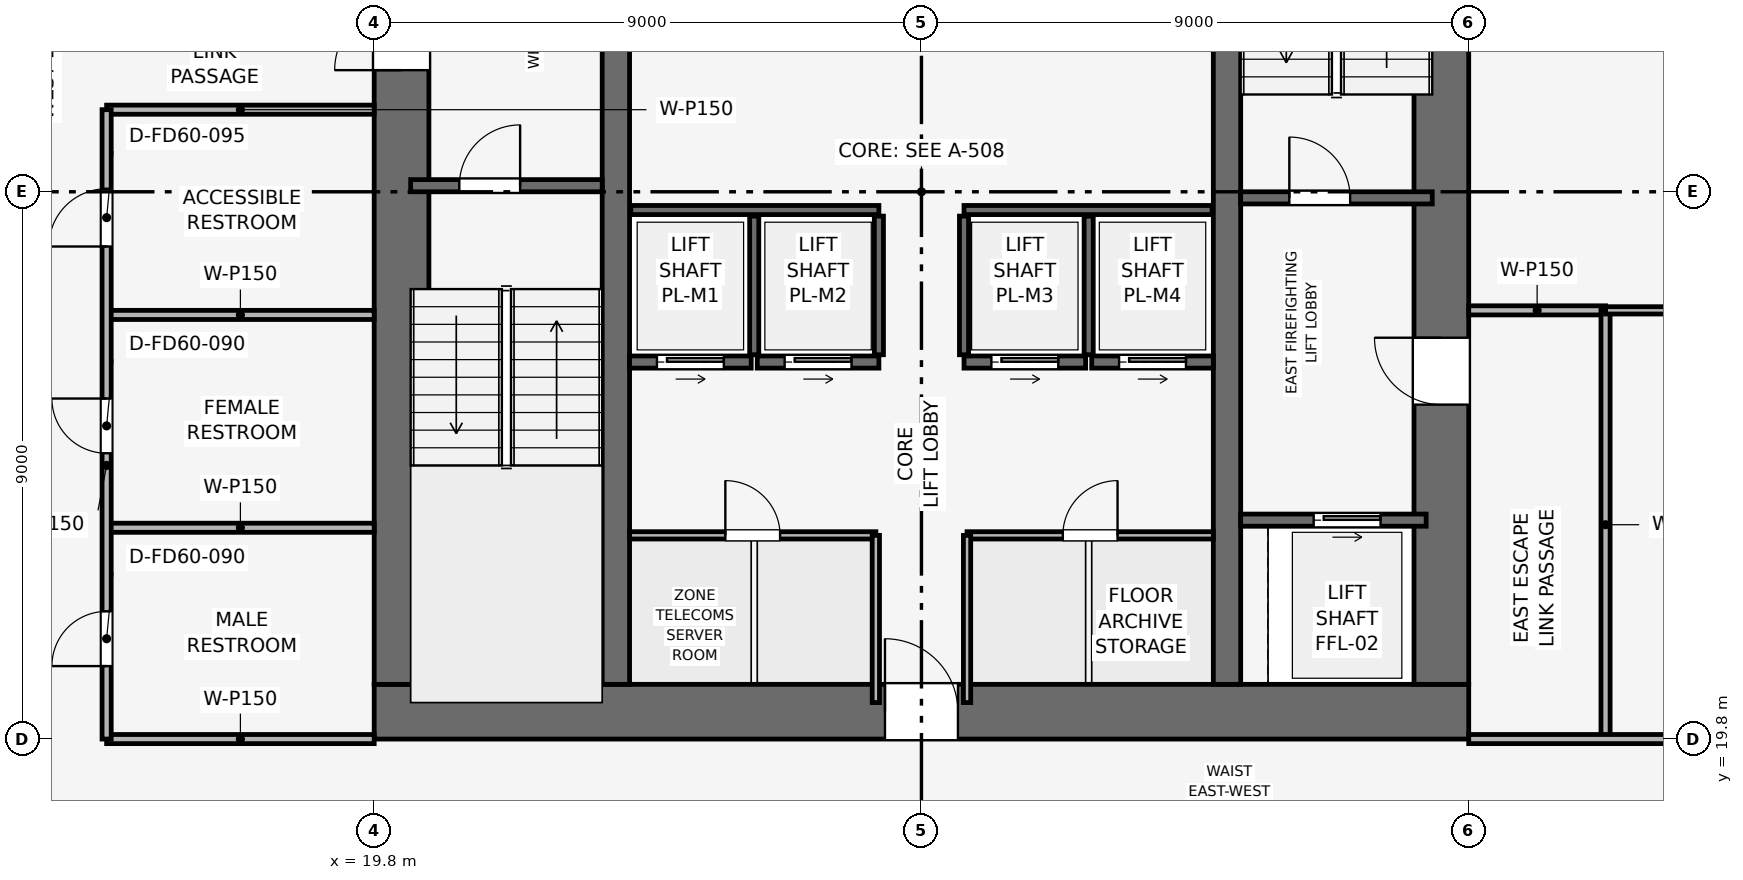
"""IFC4 building model, lengths in metres.
Left out: names, types, materials, properties, quantities, classifications, styles, units other than length and angle.
Written with IfcOpenShell. Run it as: python <this file> out.ifc"""

import sys

from ifc_helpers import new_model, si_unit, direction, frame, frame_2d, origin, place, context, subcontext, project, spatial, rectangle, extrude, element, fill, save


model = new_model("IFC4")
c1 = context("Model", 3, precision=1e-05, world=origin(), true_north=direction((0.0, 1.0)))
c2 = subcontext(c1, "Body", "Model", "MODEL_VIEW")
j1 = project(units=[si_unit("LENGTHUNIT", "METRE"), si_unit("PLANEANGLEUNIT", "RADIAN")], contexts=[c1])
p1 = place(None, origin())
s1 = spatial("IfcSite", under=j1, at=p1, CompositionType="ELEMENT")
p2 = place(p1, origin())
s2 = spatial("IfcBuilding", under=s1, at=p2, CompositionType="ELEMENT")
p3 = place(p2, frame((0.0, 0.0, 187.05)))
s3 = spatial("IfcBuildingStorey", under=s2, at=p3, CompositionType="ELEMENT", Elevation=187.05)
p4 = place(p3, frame((19.8, 20.25, 0.0), z_axis=(0.0, 0.0, 1.0), x_axis=(1.0, 0.0, 0.0)))
e1 = element("IfcWall", 1, at=p4, inside=s3, PredefinedType="SHEAR", context=c2, shape_type="SweptSolid", body=[
    extrude(rectangle(XDim=18.0, YDim=0.9, at=frame_2d((9.0, 0.0))), origin(), (0.0, 0.0, 1.0), 3.75),
])
p5 = place(p4, frame((8.4, 0.0, 0.0)))
e2 = element("IfcOpeningElement", 2, at=p5, cuts=e1, PredefinedType="OPENING", context=c2, shape_type="SweptSolid", body=[
    extrude(rectangle(XDim=1.2, YDim=2.2, at=frame_2d((0.6, 1.1))), frame((0.0, 0.46, 0.0), z_axis=(0.0, -1.0, 0.0), x_axis=(1.0, 0.0, 0.0)), (0.0, 0.0, 1.0), 0.92),
])
p6 = place(p3, frame((20.25, 20.7, 0.0), z_axis=(0.0, 0.0, 1.0), x_axis=(0.0, 1.0, 0.0)))
e3 = element("IfcWall", 3, at=p6, inside=s3, PredefinedType="SHEAR", context=c2, shape_type="SweptSolid", body=[
    extrude(rectangle(XDim=16.2, YDim=0.9, at=frame_2d((8.1, 0.0))), origin(), (0.0, 0.0, 1.0), 3.75),
])
p7 = place(p6, frame((10.1, 0.0, 0.0)))
e4 = element("IfcOpeningElement", 4, at=p7, cuts=e3, PredefinedType="OPENING", context=c2, shape_type="SweptSolid", body=[
    extrude(rectangle(XDim=1.1, YDim=2.15, at=frame_2d((0.55, 1.075))), frame((0.0, 0.46, 0.0), z_axis=(0.0, -1.0, 0.0), x_axis=(1.0, 0.0, 0.0)), (0.0, 0.0, 1.0), 0.92),
])
p8 = place(p3, frame((37.35, 20.7, 0.0), z_axis=(0.0, 0.0, 1.0), x_axis=(0.0, 1.0, 0.0)))
e5 = element("IfcWall", 5, at=p8, inside=s3, PredefinedType="SHEAR", context=c2, shape_type="SweptSolid", body=[
    extrude(rectangle(XDim=16.2, YDim=0.9, at=frame_2d((8.1, 0.0))), origin(), (0.0, 0.0, 1.0), 3.75),
])
p9 = place(p8, frame((4.6, 0.0, 0.0)))
e6 = element("IfcOpeningElement", 6, at=p9, cuts=e5, PredefinedType="OPENING", context=c2, shape_type="SweptSolid", body=[
    extrude(rectangle(XDim=1.1, YDim=2.15, at=frame_2d((0.55, 1.075))), frame((0.0, 0.46, 0.0), z_axis=(0.0, -1.0, 0.0), x_axis=(1.0, 0.0, 0.0)), (0.0, 0.0, 1.0), 0.92),
])
for number, where, z_axis, x_axis in (
    (7, (23.775, 20.7, 0.0), (0.0, 0.0, 1.0), (0.0, 1.0, 0.0)),
    (8, (33.825, 20.7, 0.0), (0.0, 0.0, 1.0), (0.0, 1.0, 0.0)),
):
    element("IfcWall", number, at=place(p3, frame(where, z_axis=z_axis, x_axis=x_axis)), inside=s3, PredefinedType="SHEAR", context=c2, shape_type="SweptSolid", body=[
        extrude(rectangle(XDim=16.2, YDim=0.45, at=frame_2d((8.1, 0.0))), origin(), (0.0, 0.0, 1.0), 3.75),
    ])
p10 = place(p3, frame((20.4, 28.9, 0.0), z_axis=(0.0, 0.0, 1.0), x_axis=(1.0, 0.0, 0.0)))
e9 = element("IfcWall", 9, at=p10, inside=s3, PredefinedType="SHEAR", context=c2, shape_type="SweptSolid", body=[
    extrude(rectangle(XDim=3.15, YDim=0.2, at=frame_2d((1.575, 0.0))), origin(), (0.0, 0.0, 1.0), 3.495),
])
p11 = place(p10, frame((0.8, 0.0, 0.0)))
e10 = element("IfcOpeningElement", 10, at=p11, cuts=e9, PredefinedType="OPENING", context=c2, shape_type="SweptSolid", body=[
    extrude(rectangle(XDim=1.0, YDim=2.1, at=frame_2d((0.5, 1.05))), frame((0.0, 0.11, 0.0), z_axis=(0.0, -1.0, 0.0), x_axis=(1.0, 0.0, 0.0)), (0.0, 0.0, 1.0), 0.22),
])
p12 = place(p3, frame((34.05, 28.7, 0.0), z_axis=(0.0, 0.0, 1.0), x_axis=(1.0, 0.0, 0.0)))
e11 = element("IfcWall", 11, at=p12, inside=s3, PredefinedType="SHEAR", context=c2, shape_type="SweptSolid", body=[
    extrude(rectangle(XDim=3.15, YDim=0.2, at=frame_2d((1.575, 0.0))), origin(), (0.0, 0.0, 1.0), 3.495),
])
p13 = place(p12, frame((0.8, 0.0, 0.0)))
e12 = element("IfcOpeningElement", 12, at=p13, cuts=e11, PredefinedType="OPENING", context=c2, shape_type="SweptSolid", body=[
    extrude(rectangle(XDim=1.0, YDim=2.1, at=frame_2d((0.5, 1.05))), frame((0.0, 0.11, 0.0), z_axis=(0.0, -1.0, 0.0), x_axis=(1.0, 0.0, 0.0)), (0.0, 0.0, 1.0), 0.22),
])
p14 = place(p3, frame((34.05, 23.4, 0.0), z_axis=(0.0, 0.0, 1.0), x_axis=(1.0, 0.0, 0.0)))
e13 = element("IfcWall", 13, at=p14, inside=s3, PredefinedType="SHEAR", context=c2, shape_type="SweptSolid", body=[
    extrude(rectangle(XDim=3.05, YDim=0.2, at=frame_2d((1.525, 0.0))), origin(), (0.0, 0.0, 1.0), 3.495),
])
p15 = place(p14, frame((1.2, 0.0, 0.0)))
e14 = element("IfcOpeningElement", 14, at=p15, cuts=e13, PredefinedType="OPENING", context=c2, shape_type="SweptSolid", body=[
    extrude(rectangle(XDim=1.1, YDim=2.15, at=frame_2d((0.55, 1.075))), frame((0.0, 0.11, 0.0), z_axis=(0.0, -1.0, 0.0), x_axis=(1.0, 0.0, 0.0)), (0.0, 0.0, 1.0), 0.22),
])
p16 = place(p3, frame((24.0, 26.0, 0.0), z_axis=(0.0, 0.0, 1.0), x_axis=(1.0, 0.0, 0.0)))
e15 = element("IfcWall", 15, at=p16, inside=s3, PredefinedType="SHEAR", context=c2, shape_type="SweptSolid", body=[
    extrude(rectangle(XDim=2.0, YDim=0.2, at=frame_2d((1.0, 0.0))), origin(), (0.0, 0.0, 1.0), 3.495),
])
p17 = place(p16, frame((0.45, 0.0, 0.0)))
e16 = element("IfcOpeningElement", 16, at=p17, cuts=e15, PredefinedType="OPENING", context=c2, shape_type="SweptSolid", body=[
    extrude(rectangle(XDim=1.1, YDim=2.15, at=frame_2d((0.55, 1.075))), frame((0.0, 0.11, 0.0), z_axis=(0.0, -1.0, 0.0), x_axis=(1.0, 0.0, 0.0)), (0.0, 0.0, 1.0), 0.22),
])
p18 = place(p3, frame((26.1, 26.0, 0.0), z_axis=(0.0, 0.0, 1.0), x_axis=(1.0, 0.0, 0.0)))
e17 = element("IfcWall", 17, at=p18, inside=s3, PredefinedType="SHEAR", context=c2, shape_type="SweptSolid", body=[
    extrude(rectangle(XDim=2.0, YDim=0.2, at=frame_2d((1.0, 0.0))), origin(), (0.0, 0.0, 1.0), 3.495),
])
p19 = place(p18, frame((0.45, 0.0, 0.0)))
e18 = element("IfcOpeningElement", 18, at=p19, cuts=e17, PredefinedType="OPENING", context=c2, shape_type="SweptSolid", body=[
    extrude(rectangle(XDim=1.1, YDim=2.15, at=frame_2d((0.55, 1.075))), frame((0.0, 0.11, 0.0), z_axis=(0.0, -1.0, 0.0), x_axis=(1.0, 0.0, 0.0)), (0.0, 0.0, 1.0), 0.22),
])
p20 = place(p3, frame((29.5, 26.0, 0.0), z_axis=(0.0, 0.0, 1.0), x_axis=(1.0, 0.0, 0.0)))
e19 = element("IfcWall", 19, at=p20, inside=s3, PredefinedType="SHEAR", context=c2, shape_type="SweptSolid", body=[
    extrude(rectangle(XDim=2.0, YDim=0.2, at=frame_2d((1.0, 0.0))), origin(), (0.0, 0.0, 1.0), 3.495),
])
p21 = place(p20, frame((0.45, 0.0, 0.0)))
e20 = element("IfcOpeningElement", 20, at=p21, cuts=e19, PredefinedType="OPENING", context=c2, shape_type="SweptSolid", body=[
    extrude(rectangle(XDim=1.1, YDim=2.15, at=frame_2d((0.55, 1.075))), frame((0.0, 0.11, 0.0), z_axis=(0.0, -1.0, 0.0), x_axis=(1.0, 0.0, 0.0)), (0.0, 0.0, 1.0), 0.22),
])
p22 = place(p3, frame((31.6, 26.0, 0.0), z_axis=(0.0, 0.0, 1.0), x_axis=(1.0, 0.0, 0.0)))
e21 = element("IfcWall", 21, at=p22, inside=s3, PredefinedType="SHEAR", context=c2, shape_type="SweptSolid", body=[
    extrude(rectangle(XDim=2.0, YDim=0.2, at=frame_2d((1.0, 0.0))), origin(), (0.0, 0.0, 1.0), 3.495),
])
p23 = place(p22, frame((0.45, 0.0, 0.0)))
e22 = element("IfcOpeningElement", 22, at=p23, cuts=e21, PredefinedType="OPENING", context=c2, shape_type="SweptSolid", body=[
    extrude(rectangle(XDim=1.1, YDim=2.15, at=frame_2d((0.55, 1.075))), frame((0.0, 0.11, 0.0), z_axis=(0.0, -1.0, 0.0), x_axis=(1.0, 0.0, 0.0)), (0.0, 0.0, 1.0), 0.22),
])
for number, where, z_axis, x_axis in (
    (23, (24.02, 28.5, 0.0), (0.0, 0.0, 1.0), (1.0, 0.0, 0.0)),
    (24, (29.5, 28.5, 0.0), (0.0, 0.0, 1.0), (1.0, 0.0, 0.0)),
):
    element("IfcWall", number, at=place(p3, frame(where, z_axis=z_axis, x_axis=x_axis)), inside=s3, PredefinedType="SHEAR", context=c2, shape_type="SweptSolid", body=[
        extrude(rectangle(XDim=4.08, YDim=0.15, at=frame_2d((2.04, 0.0))), origin(), (0.0, 0.0, 1.0), 3.495),
    ])
for number, where, z_axis, x_axis in (
    (25, (26.05, 26.12, 0.0), (0.0, 0.0, 1.0), (0.0, 1.0, 0.0)),
    (26, (28.1, 26.12, 0.0), (0.0, 0.0, 1.0), (0.0, 1.0, 0.0)),
    (27, (29.5, 26.12, 0.0), (0.0, 0.0, 1.0), (0.0, 1.0, 0.0)),
    (28, (31.55, 26.12, 0.0), (0.0, 0.0, 1.0), (0.0, 1.0, 0.0)),
):
    element("IfcWall", number, at=place(p3, frame(where, z_axis=z_axis, x_axis=x_axis)), inside=s3, PredefinedType="SHEAR", context=c2, shape_type="SweptSolid", body=[
        extrude(rectangle(XDim=2.28, YDim=0.15, at=frame_2d((1.14, 0.0))), origin(), (0.0, 0.0, 1.0), 3.495),
    ])
p24 = place(p3, frame((24.0, 23.15, 0.0), z_axis=(0.0, 0.0, 1.0), x_axis=(1.0, 0.0, 0.0)))
e29 = element("IfcWall", 29, at=p24, inside=s3, PredefinedType="PARTITIONING", context=c2, shape_type="SweptSolid", body=[
    extrude(rectangle(XDim=4.05, YDim=0.12, at=frame_2d((2.025, 0.0))), origin(), (0.0, 0.0, 1.0), 3.495),
])
p25 = place(p24, frame((1.575, 0.0, 0.0)))
e30 = element("IfcOpeningElement", 30, at=p25, cuts=e29, PredefinedType="OPENING", context=c2, shape_type="SweptSolid", body=[
    extrude(rectangle(XDim=0.9, YDim=2.1, at=frame_2d((0.45, 1.05))), frame((0.0, 0.07, 0.0), z_axis=(0.0, -1.0, 0.0), x_axis=(1.0, 0.0, 0.0)), (0.0, 0.0, 1.0), 0.14),
])
p26 = place(p3, frame((28.05, 20.4, 0.0), z_axis=(0.0, 0.0, 1.0), x_axis=(0.0, 1.0, 0.0)))
e31 = element("IfcWall", 31, at=p26, inside=s3, PredefinedType="PARTITIONING", context=c2, shape_type="SweptSolid", body=[
    extrude(rectangle(XDim=2.75, YDim=0.12, at=frame_2d((1.375, 0.0))), origin(), (0.0, 0.0, 1.0), 3.495),
])
p27 = place(p3, frame((29.55, 23.15, 0.0), z_axis=(0.0, 0.0, 1.0), x_axis=(1.0, 0.0, 0.0)))
e32 = element("IfcWall", 32, at=p27, inside=s3, PredefinedType="PARTITIONING", context=c2, shape_type="SweptSolid", body=[
    extrude(rectangle(XDim=4.05, YDim=0.12, at=frame_2d((2.025, 0.0))), origin(), (0.0, 0.0, 1.0), 3.495),
])
p28 = place(p27, frame((1.575, 0.0, 0.0)))
e33 = element("IfcOpeningElement", 33, at=p28, cuts=e32, PredefinedType="OPENING", context=c2, shape_type="SweptSolid", body=[
    extrude(rectangle(XDim=0.9, YDim=2.1, at=frame_2d((0.45, 1.05))), frame((0.0, 0.07, 0.0), z_axis=(0.0, -1.0, 0.0), x_axis=(1.0, 0.0, 0.0)), (0.0, 0.0, 1.0), 0.14),
])
p29 = place(p3, frame((29.55, 20.4, 0.0), z_axis=(0.0, 0.0, 1.0), x_axis=(0.0, 1.0, 0.0)))
e34 = element("IfcWall", 34, at=p29, inside=s3, PredefinedType="PARTITIONING", context=c2, shape_type="SweptSolid", body=[
    extrude(rectangle(XDim=2.75, YDim=0.12, at=frame_2d((1.375, 0.0))), origin(), (0.0, 0.0, 1.0), 3.495),
])
p30 = place(p3, frame((15.4, 19.8, 0.0), z_axis=(0.0, 0.0, 1.0), x_axis=(1.0, 0.0, 0.0)))
e35 = element("IfcWall", 35, at=p30, inside=s3, PredefinedType="PARTITIONING", context=c2, shape_type="SweptSolid", body=[
    extrude(rectangle(XDim=4.4, YDim=0.15, at=frame_2d((2.2, 0.0))), origin(), (0.0, 0.0, 1.0), 3.03),
])
for number, where, z_axis, x_axis in (
    (36, (15.4, 23.275, 0.0), (0.0, 0.0, 1.0), (1.0, 0.0, 0.0)),
    (37, (15.4, 26.775, 0.0), (0.0, 0.0, 1.0), (1.0, 0.0, 0.0)),
    (38, (15.4, 30.15, 0.0), (0.0, 0.0, 1.0), (1.0, 0.0, 0.0)),
):
    element("IfcWall", number, at=place(p3, frame(where, z_axis=z_axis, x_axis=x_axis)), inside=s3, PredefinedType="PARTITIONING", context=c2, shape_type="SweptSolid", body=[
        extrude(rectangle(XDim=4.4, YDim=0.15, at=frame_2d((2.2, 0.0))), origin(), (0.0, 0.0, 1.0), 3.495),
    ])
p31 = place(p3, frame((15.4, 19.8, 0.0), z_axis=(0.0, 0.0, 1.0), x_axis=(0.0, 1.0, 0.0)))
e39 = element("IfcWall", 39, at=p31, inside=s3, PredefinedType="PARTITIONING", context=c2, shape_type="SweptSolid", body=[
    extrude(rectangle(XDim=10.35, YDim=0.15, at=frame_2d((5.175, 0.0))), origin(), (0.0, 0.0, 1.0), 3.03),
])
p32 = place(p31, frame((1.2, 0.0, 0.0)))
e40 = element("IfcOpeningElement", 40, at=p32, cuts=e39, PredefinedType="OPENING", context=c2, shape_type="SweptSolid", body=[
    extrude(rectangle(XDim=0.9, YDim=2.1, at=frame_2d((0.45, 1.05))), frame((0.0, 0.085, 0.0), z_axis=(0.0, -1.0, 0.0), x_axis=(1.0, 0.0, 0.0)), (0.0, 0.0, 1.0), 0.17),
])
p33 = place(p31, frame((4.7, 0.0, 0.0)))
e41 = element("IfcOpeningElement", 41, at=p33, cuts=e39, PredefinedType="OPENING", context=c2, shape_type="SweptSolid", body=[
    extrude(rectangle(XDim=0.9, YDim=2.1, at=frame_2d((0.45, 1.05))), frame((0.0, 0.085, 0.0), z_axis=(0.0, -1.0, 0.0), x_axis=(1.0, 0.0, 0.0)), (0.0, 0.0, 1.0), 0.17),
])
p34 = place(p31, frame((8.1, 0.0, 0.0)))
e42 = element("IfcOpeningElement", 42, at=p34, cuts=e39, PredefinedType="OPENING", context=c2, shape_type="SweptSolid", body=[
    extrude(rectangle(XDim=0.95, YDim=2.1, at=frame_2d((0.475, 1.05))), frame((0.0, 0.085, 0.0), z_axis=(0.0, -1.0, 0.0), x_axis=(1.0, 0.0, 0.0)), (0.0, 0.0, 1.0), 0.17),
])
p35 = place(p3, frame((37.8, 26.85, 0.0), z_axis=(0.0, 0.0, 1.0), x_axis=(1.0, 0.0, 0.0)))
e43 = element("IfcWall", 43, at=p35, inside=s3, PredefinedType="PARTITIONING", context=c2, shape_type="SweptSolid", body=[
    extrude(rectangle(XDim=2.25, YDim=0.15, at=frame_2d((1.125, 0.0))), origin(), (0.0, 0.0, 1.0), 3.495),
])
p36 = place(p3, frame((40.05, 19.8, 0.0), z_axis=(0.0, 0.0, 1.0), x_axis=(0.0, 1.0, 0.0)))
e44 = element("IfcWall", 44, at=p36, inside=s3, PredefinedType="PARTITIONING", context=c2, shape_type="SweptSolid", body=[
    extrude(rectangle(XDim=7.05, YDim=0.15, at=frame_2d((3.525, 0.0))), origin(), (0.0, 0.0, 1.0), 3.03),
])
p37 = place(p3, frame((40.05, 26.85, 0.0), z_axis=(0.0, 0.0, 1.0), x_axis=(1.0, 0.0, 0.0)))
e45 = element("IfcWall", 45, at=p37, inside=s3, PredefinedType="PARTITIONING", context=c2, shape_type="SweptSolid", body=[
    extrude(rectangle(XDim=12.92, YDim=0.12, at=frame_2d((6.46, 0.0))), origin(), (0.0, 0.0, 1.0), 2.98),
])
p38 = place(p37, frame((6.01, 0.0, 0.0)))
e46 = element("IfcOpeningElement", 46, at=p38, cuts=e45, PredefinedType="OPENING", context=c2, shape_type="SweptSolid", body=[
    extrude(rectangle(XDim=0.9, YDim=2.1, at=frame_2d((0.45, 1.05))), frame((0.0, 0.07, 0.0), z_axis=(0.0, -1.0, 0.0), x_axis=(1.0, 0.0, 0.0)), (0.0, 0.0, 1.0), 0.14),
])
p39 = place(p3, frame((37.8, 19.8, 0.0), z_axis=(0.0, 0.0, 1.0), x_axis=(1.0, 0.0, 0.0)))
e47 = element("IfcWall", 47, at=p39, inside=s3, PredefinedType="PARTITIONING", context=c2, shape_type="SweptSolid", body=[
    extrude(rectangle(XDim=15.17, YDim=0.15, at=frame_2d((7.585, 0.0))), origin(), (0.0, 0.0, 1.0), 2.98),
])
p40 = place(p39, frame((4.4, 0.0, 0.0)))
e48 = element("IfcOpeningElement", 48, at=p40, cuts=e47, PredefinedType="OPENING", context=c2, shape_type="SweptSolid", body=[
    extrude(rectangle(XDim=0.9, YDim=2.1, at=frame_2d((0.45, 1.05))), frame((0.0, 0.085, 0.0), z_axis=(0.0, -1.0, 0.0), x_axis=(1.0, 0.0, 0.0)), (0.0, 0.0, 1.0), 0.17),
])
p41 = place(p11, origin())
e49 = element("IfcDoor", 49, at=p41, inside=s3, OperationType="SINGLE_SWING_RIGHT", PredefinedType="DOOR", context=c2, shape_type="SweptSolid", body=[
    extrude(rectangle(XDim=1.0, YDim=2.1, at=frame_2d((0.5, 1.05))), frame((0.0, 0.025, 0.0), z_axis=(0.0, -1.0, 0.0), x_axis=(1.0, 0.0, 0.0)), (0.0, 0.0, 1.0), 0.05),
])
fill(e10, e49)
p42 = place(p13, origin())
e50 = element("IfcDoor", 50, at=p42, inside=s3, OperationType="SINGLE_SWING_LEFT", PredefinedType="DOOR", context=c2, shape_type="SweptSolid", body=[
    extrude(rectangle(XDim=1.0, YDim=2.1, at=frame_2d((0.5, 1.05))), frame((0.0, 0.025, 0.0), z_axis=(0.0, -1.0, 0.0), x_axis=(1.0, 0.0, 0.0)), (0.0, 0.0, 1.0), 0.05),
])
fill(e12, e50)
p43 = place(p15, origin())
e51 = element("IfcDoor", 51, at=p43, inside=s3, OperationType="SLIDING_TO_RIGHT", PredefinedType="DOOR", context=c2, shape_type="SweptSolid", body=[
    extrude(rectangle(XDim=1.1, YDim=2.15, at=frame_2d((0.55, 1.075))), frame((0.0, 0.025, 0.0), z_axis=(0.0, -1.0, 0.0), x_axis=(1.0, 0.0, 0.0)), (0.0, 0.0, 1.0), 0.05),
])
fill(e14, e51)
p44 = place(p17, origin())
e52 = element("IfcDoor", 52, at=p44, inside=s3, OperationType="SLIDING_TO_RIGHT", PredefinedType="DOOR", context=c2, shape_type="SweptSolid", body=[
    extrude(rectangle(XDim=1.1, YDim=2.15, at=frame_2d((0.55, 1.075))), frame((0.0, 0.025, 0.0), z_axis=(0.0, -1.0, 0.0), x_axis=(1.0, 0.0, 0.0)), (0.0, 0.0, 1.0), 0.05),
])
fill(e16, e52)
p45 = place(p19, origin())
e53 = element("IfcDoor", 53, at=p45, inside=s3, OperationType="SLIDING_TO_RIGHT", PredefinedType="DOOR", context=c2, shape_type="SweptSolid", body=[
    extrude(rectangle(XDim=1.1, YDim=2.15, at=frame_2d((0.55, 1.075))), frame((0.0, 0.025, 0.0), z_axis=(0.0, -1.0, 0.0), x_axis=(1.0, 0.0, 0.0)), (0.0, 0.0, 1.0), 0.05),
])
fill(e18, e53)
p46 = place(p21, origin())
e54 = element("IfcDoor", 54, at=p46, inside=s3, OperationType="SLIDING_TO_RIGHT", PredefinedType="DOOR", context=c2, shape_type="SweptSolid", body=[
    extrude(rectangle(XDim=1.1, YDim=2.15, at=frame_2d((0.55, 1.075))), frame((0.0, 0.025, 0.0), z_axis=(0.0, -1.0, 0.0), x_axis=(1.0, 0.0, 0.0)), (0.0, 0.0, 1.0), 0.05),
])
fill(e20, e54)
p47 = place(p23, origin())
e55 = element("IfcDoor", 55, at=p47, inside=s3, OperationType="SLIDING_TO_RIGHT", PredefinedType="DOOR", context=c2, shape_type="SweptSolid", body=[
    extrude(rectangle(XDim=1.1, YDim=2.15, at=frame_2d((0.55, 1.075))), frame((0.0, 0.025, 0.0), z_axis=(0.0, -1.0, 0.0), x_axis=(1.0, 0.0, 0.0)), (0.0, 0.0, 1.0), 0.05),
])
fill(e22, e55)
p48 = place(p25, origin())
e56 = element("IfcDoor", 56, at=p48, inside=s3, OperationType="SINGLE_SWING_LEFT", PredefinedType="DOOR", context=c2, shape_type="SweptSolid", body=[
    extrude(rectangle(XDim=0.9, YDim=2.1, at=frame_2d((0.45, 1.05))), frame((0.0, 0.025, 0.0), z_axis=(0.0, -1.0, 0.0), x_axis=(1.0, 0.0, 0.0)), (0.0, 0.0, 1.0), 0.05),
])
fill(e30, e56)
p49 = place(p28, origin())
e57 = element("IfcDoor", 57, at=p49, inside=s3, OperationType="SINGLE_SWING_RIGHT", PredefinedType="DOOR", context=c2, shape_type="SweptSolid", body=[
    extrude(rectangle(XDim=0.9, YDim=2.1, at=frame_2d((0.45, 1.05))), frame((0.0, 0.025, 0.0), z_axis=(0.0, -1.0, 0.0), x_axis=(1.0, 0.0, 0.0)), (0.0, 0.0, 1.0), 0.05),
])
fill(e33, e57)
p50 = place(p32, origin())
e58 = element("IfcDoor", 58, at=p50, inside=s3, OperationType="SINGLE_SWING_LEFT", PredefinedType="DOOR", context=c2, shape_type="SweptSolid", body=[
    extrude(rectangle(XDim=0.9, YDim=2.1, at=frame_2d((0.45, 1.05))), frame((0.0, 0.025, 0.0), z_axis=(0.0, -1.0, 0.0), x_axis=(1.0, 0.0, 0.0)), (0.0, 0.0, 1.0), 0.05),
])
fill(e40, e58)
p51 = place(p33, origin())
e59 = element("IfcDoor", 59, at=p51, inside=s3, OperationType="SINGLE_SWING_RIGHT", PredefinedType="DOOR", context=c2, shape_type="SweptSolid", body=[
    extrude(rectangle(XDim=0.9, YDim=2.1, at=frame_2d((0.45, 1.05))), frame((0.0, 0.025, 0.0), z_axis=(0.0, -1.0, 0.0), x_axis=(1.0, 0.0, 0.0)), (0.0, 0.0, 1.0), 0.05),
])
fill(e41, e59)
p52 = place(p34, origin())
e60 = element("IfcDoor", 60, at=p52, inside=s3, OperationType="SINGLE_SWING_LEFT", PredefinedType="DOOR", context=c2, shape_type="SweptSolid", body=[
    extrude(rectangle(XDim=0.95, YDim=2.1, at=frame_2d((0.475, 1.05))), frame((0.0, 0.025, 0.0), z_axis=(0.0, -1.0, 0.0), x_axis=(1.0, 0.0, 0.0)), (0.0, 0.0, 1.0), 0.05),
])
fill(e42, e60)
p53 = place(p7, origin())
e61 = element("IfcDoor", 61, at=p53, inside=s3, OperationType="SINGLE_SWING_LEFT", PredefinedType="DOOR", context=c2, shape_type="SweptSolid", body=[
    extrude(rectangle(XDim=1.1, YDim=2.15, at=frame_2d((0.55, 1.075))), frame((0.0, 0.025, 0.0), z_axis=(0.0, -1.0, 0.0), x_axis=(1.0, 0.0, 0.0)), (0.0, 0.0, 1.0), 0.05),
])
fill(e4, e61)
p54 = place(p9, origin())
e62 = element("IfcDoor", 62, at=p54, inside=s3, OperationType="SINGLE_SWING_RIGHT", PredefinedType="DOOR", context=c2, shape_type="SweptSolid", body=[
    extrude(rectangle(XDim=1.1, YDim=2.15, at=frame_2d((0.55, 1.075))), frame((0.0, 0.025, 0.0), z_axis=(0.0, -1.0, 0.0), x_axis=(1.0, 0.0, 0.0)), (0.0, 0.0, 1.0), 0.05),
])
fill(e6, e62)
p55 = place(p5, origin())
e63 = element("IfcDoor", 63, at=p55, inside=s3, OperationType="SINGLE_SWING_LEFT", PredefinedType="DOOR", context=c2, shape_type="SweptSolid", body=[
    extrude(rectangle(XDim=1.2, YDim=2.2, at=frame_2d((0.6, 1.1))), frame((0.0, 0.025, 0.0), z_axis=(0.0, -1.0, 0.0), x_axis=(1.0, 0.0, 0.0)), (0.0, 0.0, 1.0), 0.05),
])
fill(e2, e63)
save(model, sys.argv[1])
